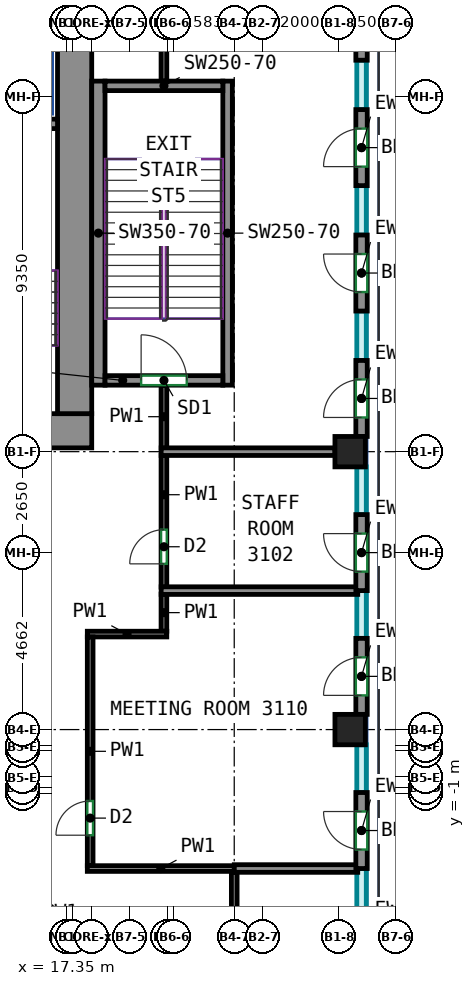
"""IFC4 building model, lengths in metres.
Left out: names, types, materials, properties, quantities, classifications, styles, units other than length and angle.
Written with IfcOpenShell. Run it as: python <this file> out.ifc"""

import sys

from ifc_helpers import new_model, si_unit, direction, frame, frame_2d, origin, origin_2d, place, context, subcontext, project, spatial, rectangle, extrude, source, transform, mapped, element, fill, save


model = new_model("IFC4")
c1 = context("Model", 3, precision=1e-05, world=origin(), true_north=direction((0.0, 1.0)))
c2 = subcontext(c1, "Body", "Model", "MODEL_VIEW")
j1 = project(units=[si_unit("LENGTHUNIT", "METRE"), si_unit("PLANEANGLEUNIT", "RADIAN")], contexts=[c1])
p1 = place(None, origin())
s1 = spatial("IfcSite", under=j1, at=p1, CompositionType="ELEMENT")
p2 = place(p1, origin())
s2 = spatial("IfcBuilding", under=s1, at=p2, CompositionType="ELEMENT")
p3 = place(p2, frame((0.0, 0.0, 138.5)))
s3 = spatial("IfcBuildingStorey", under=s2, at=p3, CompositionType="ELEMENT", Elevation=138.5)
m1 = source(origin(), c2, "Body", "SweptSolid", [
    extrude(rectangle(XDim=0.8, YDim=0.8, at=origin_2d()), origin(), (0.0, 0.0, 1.0), 5.12),
])
for number, where, z_axis, x_axis in (
    (1, (24.8, 0.688, 0.0), (0.0, 0.0, 1.0), (1.0, 0.0, 0.0)),
    (2, (24.8, 8.0, 0.0), (0.0, 0.0, 1.0), (1.0, 0.0, 0.0)),
):
    element("IfcColumn", number, at=place(p3, frame(where, z_axis=z_axis, x_axis=x_axis)), inside=s3, PredefinedType="COLUMN", context=c2, shape_type="MappedRepresentation", body=[
        mapped(m1, transform((0.0, 0.0, 0.0))),
    ])
m2 = source(origin(), c2, "Body", "SweptSolid", [
    extrude(rectangle(XDim=5.53, YDim=0.9, at=frame_2d((2.765, 0.0))), origin(), (0.0, 0.0, 1.0), 5.12),
])
p4 = place(p3, frame((12.47, 8.55, 0.0), z_axis=(0.0, 0.0, 1.0), x_axis=(1.0, 0.0, 0.0)))
e3 = element("IfcWall", 3, at=p4, inside=s3, PredefinedType="SHEAR", context=c2, shape_type="MappedRepresentation", body=[
    mapped(m2, transform((0.0, 0.0, 0.0))),
])
p5 = place(p4, frame((2.18, 0.0, 0.0)))
e4 = element("IfcOpeningElement", 4, at=p5, cuts=e3, PredefinedType="OPENING", context=c2, shape_type="SweptSolid", body=[
    extrude(rectangle(XDim=1.2, YDim=2.1, at=frame_2d((0.6, 1.05))), frame((0.0, 0.46, 0.0), z_axis=(0.0, -1.0, 0.0), x_axis=(1.0, 0.0, 0.0)), (0.0, 0.0, 1.0), 0.92),
])
m3 = source(origin(), c2, "Body", "SweptSolid", [
    extrude(rectangle(XDim=12.0, YDim=0.9, at=frame_2d((6.0, 0.0))), origin(), (0.0, 0.0, 1.0), 5.12),
])
p6 = place(p3, frame((17.55, 9.0, 0.0), z_axis=(0.0, 0.0, 1.0), x_axis=(0.0, 1.0, 0.0)))
e5 = element("IfcWall", 5, at=p6, inside=s3, PredefinedType="SHEAR", context=c2, shape_type="MappedRepresentation", body=[
    mapped(m3, transform((0.0, 0.0, 0.0))),
])
m4 = source(origin(), c2, "Body", "SweptSolid", [
    extrude(rectangle(XDim=3.7, YDim=0.25, at=frame_2d((1.85, 0.0))), origin(), (0.0, 0.0, 1.0), 5.12),
])
p7 = place(p3, frame((13.4, 16.625, 0.0), z_axis=(0.0, 0.0, 1.0), x_axis=(1.0, 0.0, 0.0)))
e6 = element("IfcWall", 6, at=p7, inside=s3, PredefinedType="SHEAR", context=c2, shape_type="MappedRepresentation", body=[
    mapped(m4, transform((0.0, 0.0, 0.0))),
])
m5 = source(origin(), c2, "Body", "SweptSolid", [
    extrude(rectangle(XDim=8.0, YDim=0.35, at=frame_2d((4.0, 0.0))), origin(), (0.0, 0.0, 1.0), 5.12),
])
p8 = place(p3, frame((18.175, 9.75, 0.0), z_axis=(0.0, 0.0, 1.0), x_axis=(0.0, 1.0, 0.0)))
e7 = element("IfcWall", 7, at=p8, inside=s3, PredefinedType="SHEAR", context=c2, shape_type="MappedRepresentation", body=[
    mapped(m5, transform((0.0, 0.0, 0.0))),
])
m6 = source(origin(), c2, "Body", "SweptSolid", [
    extrude(rectangle(XDim=8.0, YDim=0.25, at=frame_2d((4.0, 0.0))), origin(), (0.0, 0.0, 1.0), 5.12),
])
p9 = place(p3, frame((21.575, 9.75, 0.0), z_axis=(0.0, 0.0, 1.0), x_axis=(0.0, 1.0, 0.0)))
e8 = element("IfcWall", 8, at=p9, inside=s3, PredefinedType="SHEAR", context=c2, shape_type="MappedRepresentation", body=[
    mapped(m6, transform((0.0, 0.0, 0.0))),
])
m7 = source(origin(), c2, "Body", "SweptSolid", [
    extrude(rectangle(XDim=3.1, YDim=0.25, at=frame_2d((1.55, 0.0))), origin(), (0.0, 0.0, 1.0), 5.12),
])
p10 = place(p3, frame((18.35, 9.875, 0.0), z_axis=(0.0, 0.0, 1.0), x_axis=(1.0, 0.0, 0.0)))
e9 = element("IfcWall", 9, at=p10, inside=s3, PredefinedType="SHEAR", context=c2, shape_type="MappedRepresentation", body=[
    mapped(m7, transform((0.0, 0.0, 0.0))),
])
p11 = place(p10, frame((0.95, 0.0, 0.0)))
e10 = element("IfcOpeningElement", 10, at=p11, cuts=e9, PredefinedType="OPENING", context=c2, shape_type="SweptSolid", body=[
    extrude(rectangle(XDim=1.2, YDim=2.1, at=frame_2d((0.6, 1.05))), frame((0.0, 0.135, 0.0), z_axis=(0.0, -1.0, 0.0), x_axis=(1.0, 0.0, 0.0)), (0.0, 0.0, 1.0), 0.27),
])
p12 = place(p3, frame((18.35, 17.625, 0.0), z_axis=(0.0, 0.0, 1.0), x_axis=(1.0, 0.0, 0.0)))
e11 = element("IfcWall", 11, at=p12, inside=s3, PredefinedType="SHEAR", context=c2, shape_type="MappedRepresentation", body=[
    mapped(m7, transform((0.0, 0.0, 0.0))),
])
m8 = source(origin(), c2, "Body", "SweptSolid", [
    extrude(rectangle(XDim=2.0, YDim=0.3, at=frame_2d((1.0, 0.0))), origin(), (0.0, 0.0, 1.0), 5.12),
])
p13 = place(p3, frame((25.1, -2.969, 0.0), z_axis=(0.0, 0.0, 1.0), x_axis=(0.0, 1.0, 0.0)))
e12 = element("IfcWall", 12, at=p13, inside=s3, PredefinedType="SOLIDWALL", context=c2, shape_type="MappedRepresentation", body=[
    mapped(m8, transform((0.0, 0.0, 0.0))),
])
p14 = place(p13, frame((0.5, 0.0, 0.0)))
e13 = element("IfcOpeningElement", 13, at=p14, cuts=e12, PredefinedType="OPENING", context=c2, shape_type="SweptSolid", body=[
    extrude(rectangle(XDim=1.0, YDim=2.1, at=frame_2d((0.5, 1.05))), frame((0.0, 0.16, 0.0), z_axis=(0.0, -1.0, 0.0), x_axis=(1.0, 0.0, 0.0)), (0.0, 0.0, 1.0), 0.32),
])
p15 = place(p3, frame((25.1, 1.087, 0.0), z_axis=(0.0, 0.0, 1.0), x_axis=(0.0, 1.0, 0.0)))
e14 = element("IfcWall", 14, at=p15, inside=s3, PredefinedType="SOLIDWALL", context=c2, shape_type="MappedRepresentation", body=[
    mapped(m8, transform((0.0, 0.0, 0.0))),
])
p16 = place(p15, frame((0.5, 0.0, 0.0)))
e15 = element("IfcOpeningElement", 15, at=p16, cuts=e14, PredefinedType="OPENING", context=c2, shape_type="SweptSolid", body=[
    extrude(rectangle(XDim=1.0, YDim=2.1, at=frame_2d((0.5, 1.05))), frame((0.0, 0.16, 0.0), z_axis=(0.0, -1.0, 0.0), x_axis=(1.0, 0.0, 0.0)), (0.0, 0.0, 1.0), 0.32),
])
p17 = place(p3, frame((25.1, 4.344, 0.0), z_axis=(0.0, 0.0, 1.0), x_axis=(0.0, 1.0, 0.0)))
e16 = element("IfcWall", 16, at=p17, inside=s3, PredefinedType="SOLIDWALL", context=c2, shape_type="MappedRepresentation", body=[
    mapped(m8, transform((0.0, 0.0, 0.0))),
])
p18 = place(p17, frame((0.5, 0.0, 0.0)))
e17 = element("IfcOpeningElement", 17, at=p18, cuts=e16, PredefinedType="OPENING", context=c2, shape_type="SweptSolid", body=[
    extrude(rectangle(XDim=1.0, YDim=2.1, at=frame_2d((0.5, 1.05))), frame((0.0, 0.16, 0.0), z_axis=(0.0, -1.0, 0.0), x_axis=(1.0, 0.0, 0.0)), (0.0, 0.0, 1.0), 0.32),
])
p19 = place(p3, frame((25.1, 8.4, 0.0), z_axis=(0.0, 0.0, 1.0), x_axis=(0.0, 1.0, 0.0)))
e18 = element("IfcWall", 18, at=p19, inside=s3, PredefinedType="SOLIDWALL", context=c2, shape_type="MappedRepresentation", body=[
    mapped(m8, transform((0.0, 0.0, 0.0))),
])
p20 = place(p19, frame((0.5, 0.0, 0.0)))
e19 = element("IfcOpeningElement", 19, at=p20, cuts=e18, PredefinedType="OPENING", context=c2, shape_type="SweptSolid", body=[
    extrude(rectangle(XDim=1.0, YDim=2.1, at=frame_2d((0.5, 1.05))), frame((0.0, 0.16, 0.0), z_axis=(0.0, -1.0, 0.0), x_axis=(1.0, 0.0, 0.0)), (0.0, 0.0, 1.0), 0.32),
])
p21 = place(p3, frame((25.1, 11.7, 0.0), z_axis=(0.0, 0.0, 1.0), x_axis=(0.0, 1.0, 0.0)))
e20 = element("IfcWall", 20, at=p21, inside=s3, PredefinedType="SOLIDWALL", context=c2, shape_type="MappedRepresentation", body=[
    mapped(m8, transform((0.0, 0.0, 0.0))),
])
p22 = place(p21, frame((0.5, 0.0, 0.0)))
e21 = element("IfcOpeningElement", 21, at=p22, cuts=e20, PredefinedType="OPENING", context=c2, shape_type="SweptSolid", body=[
    extrude(rectangle(XDim=1.0, YDim=2.1, at=frame_2d((0.5, 1.05))), frame((0.0, 0.16, 0.0), z_axis=(0.0, -1.0, 0.0), x_axis=(1.0, 0.0, 0.0)), (0.0, 0.0, 1.0), 0.32),
])
p23 = place(p3, frame((25.1, 15.0, 0.0), z_axis=(0.0, 0.0, 1.0), x_axis=(0.0, 1.0, 0.0)))
e22 = element("IfcWall", 22, at=p23, inside=s3, PredefinedType="SOLIDWALL", context=c2, shape_type="MappedRepresentation", body=[
    mapped(m8, transform((0.0, 0.0, 0.0))),
])
p24 = place(p23, frame((0.5, 0.0, 0.0)))
e23 = element("IfcOpeningElement", 23, at=p24, cuts=e22, PredefinedType="OPENING", context=c2, shape_type="SweptSolid", body=[
    extrude(rectangle(XDim=1.0, YDim=2.1, at=frame_2d((0.5, 1.05))), frame((0.0, 0.16, 0.0), z_axis=(0.0, -1.0, 0.0), x_axis=(1.0, 0.0, 0.0)), (0.0, 0.0, 1.0), 0.32),
])
p25 = place(p3, frame((25.1, 18.3, 0.0), z_axis=(0.0, 0.0, 1.0), x_axis=(0.0, 1.0, 0.0)))
e24 = element("IfcWall", 24, at=p25, inside=s3, PredefinedType="SOLIDWALL", context=c2, shape_type="MappedRepresentation", body=[
    mapped(m8, transform((0.0, 0.0, 0.0))),
])
p26 = place(p25, frame((0.5, 0.0, 0.0)))
e25 = element("IfcOpeningElement", 25, at=p26, cuts=e24, PredefinedType="OPENING", context=c2, shape_type="SweptSolid", body=[
    extrude(rectangle(XDim=1.0, YDim=2.1, at=frame_2d((0.5, 1.05))), frame((0.0, 0.16, 0.0), z_axis=(0.0, -1.0, 0.0), x_axis=(1.0, 0.0, 0.0)), (0.0, 0.0, 1.0), 0.32),
])
p27 = place(p3, frame((19.9, 4.434, 0.0), z_axis=(0.0, 0.0, 1.0), x_axis=(0.0, 1.0, 0.0)))
e26 = element("IfcWall", 26, at=p27, inside=s3, PredefinedType="PARTITIONING", context=c2, shape_type="SweptSolid", body=[
    extrude(rectangle(XDim=3.476, YDim=0.15, at=frame_2d((1.738, 0.0))), origin(), (0.0, 0.0, 1.0), 5.12),
])
p28 = place(p27, frame((0.614, 0.0, 0.0)))
e27 = element("IfcOpeningElement", 27, at=p28, cuts=e26, PredefinedType="OPENING", context=c2, shape_type="SweptSolid", body=[
    extrude(rectangle(XDim=0.9, YDim=2.1, at=frame_2d((0.45, 1.05))), frame((0.0, 0.085, 0.0), z_axis=(0.0, -1.0, 0.0), x_axis=(1.0, 0.0, 0.0)), (0.0, 0.0, 1.0), 0.17),
])
p29 = place(p3, frame((19.9, 17.75, 0.0), z_axis=(0.0, 0.0, 1.0), x_axis=(0.0, 1.0, 0.0)))
e28 = element("IfcWall", 28, at=p29, inside=s3, PredefinedType="PARTITIONING", context=c2, shape_type="SweptSolid", body=[
    extrude(rectangle(XDim=4.175, YDim=0.15, at=frame_2d((2.087, 0.0))), origin(), (0.0, 0.0, 1.0), 5.12),
])
p30 = place(p29, frame((2.87, 0.0, 0.0)))
e29 = element("IfcOpeningElement", 29, at=p30, cuts=e28, PredefinedType="OPENING", context=c2, shape_type="SweptSolid", body=[
    extrude(rectangle(XDim=0.9, YDim=2.1, at=frame_2d((0.45, 1.05))), frame((0.0, 0.085, 0.0), z_axis=(0.0, -1.0, 0.0), x_axis=(1.0, 0.0, 0.0)), (0.0, 0.0, 1.0), 0.17),
])
p31 = place(p3, frame((19.9, 8.09, 0.0), z_axis=(0.0, 0.0, 1.0), x_axis=(0.0, 1.0, 0.0)))
e30 = element("IfcWall", 30, at=p31, inside=s3, PredefinedType="PARTITIONING", context=c2, shape_type="SweptSolid", body=[
    extrude(rectangle(XDim=1.66, YDim=0.15, at=frame_2d((0.83, 0.0))), origin(), (0.0, 0.0, 1.0), 5.12),
])
p32 = place(p3, frame((19.9, 3.275, 0.0), z_axis=(0.0, 0.0, 1.0), x_axis=(0.0, 1.0, 0.0)))
e31 = element("IfcWall", 31, at=p32, inside=s3, PredefinedType="PARTITIONING", context=c2, shape_type="SweptSolid", body=[
    extrude(rectangle(XDim=0.979, YDim=0.15, at=frame_2d((0.49, 0.0))), origin(), (0.0, 0.0, 1.0), 5.12),
])
p33 = place(p3, frame((17.884, 3.2, 0.0), z_axis=(0.0, 0.0, 1.0), x_axis=(1.0, 0.0, 0.0)))
e32 = element("IfcWall", 32, at=p33, inside=s3, PredefinedType="PARTITIONING", context=c2, shape_type="SweptSolid", body=[
    extrude(rectangle(XDim=2.091, YDim=0.15, at=frame_2d((1.045, 0.0))), origin(), (0.0, 0.0, 1.0), 5.12),
])
p34 = place(p3, frame((17.959, -2.894, 0.0), z_axis=(0.0, 0.0, 1.0), x_axis=(0.0, 1.0, 0.0)))
e33 = element("IfcWall", 33, at=p34, inside=s3, PredefinedType="PARTITIONING", context=c2, shape_type="SweptSolid", body=[
    extrude(rectangle(XDim=6.019, YDim=0.15, at=frame_2d((3.01, 0.0))), origin(), (0.0, 0.0, 1.0), 5.12),
])
p35 = place(p34, frame((0.802, 0.0, 0.0)))
e34 = element("IfcOpeningElement", 34, at=p35, cuts=e33, PredefinedType="OPENING", context=c2, shape_type="SweptSolid", body=[
    extrude(rectangle(XDim=0.9, YDim=2.1, at=frame_2d((0.45, 1.05))), frame((0.0, 0.085, 0.0), z_axis=(0.0, -1.0, 0.0), x_axis=(1.0, 0.0, 0.0)), (0.0, 0.0, 1.0), 0.17),
])
p36 = place(p3, frame((21.751, -2.969, 0.0), z_axis=(0.0, 0.0, 1.0), x_axis=(-1.0, 0.0, 0.0)))
e35 = element("IfcWall", 35, at=p36, inside=s3, PredefinedType="PARTITIONING", context=c2, shape_type="SweptSolid", body=[
    extrude(rectangle(XDim=3.867, YDim=0.15, at=frame_2d((1.934, 0.0))), origin(), (0.0, 0.0, 1.0), 5.12),
])
p37 = place(p3, frame((21.75, -7.75, 0.0), z_axis=(0.0, 0.0, 1.0), x_axis=(0.0, 1.0, 0.0)))
e36 = element("IfcWall", 36, at=p37, inside=s3, PredefinedType="PARTITIONING", context=c2, shape_type="SweptSolid", body=[
    extrude(rectangle(XDim=4.682, YDim=0.15, at=frame_2d((2.341, 0.0))), origin(), (0.0, 0.0, 1.0), 5.12),
])
p38 = place(p37, frame((0.801, 0.0, 0.0)))
e37 = element("IfcOpeningElement", 37, at=p38, cuts=e36, PredefinedType="OPENING", context=c2, shape_type="SweptSolid", body=[
    extrude(rectangle(XDim=0.9, YDim=2.1, at=frame_2d((0.45, 1.05))), frame((0.0, 0.085, 0.0), z_axis=(0.0, -1.0, 0.0), x_axis=(1.0, 0.0, 0.0)), (0.0, 0.0, 1.0), 0.17),
])
p39 = place(p3, frame((19.827, 8.0, 0.0), z_axis=(0.0, 0.0, 1.0), x_axis=(1.0, 0.0, 0.0)))
e38 = element("IfcWall", 38, at=p39, inside=s3, PredefinedType="PARTITIONING", context=c2, shape_type="SweptSolid", body=[
    extrude(rectangle(XDim=4.573, YDim=0.2, at=frame_2d((2.287, 0.0))), origin(), (0.0, 0.0, 1.0), 5.12),
])
p40 = place(p3, frame((19.827, 4.344, 0.0), z_axis=(0.0, 0.0, 1.0), x_axis=(1.0, 0.0, 0.0)))
e39 = element("IfcWall", 39, at=p40, inside=s3, PredefinedType="PARTITIONING", context=c2, shape_type="SweptSolid", body=[
    extrude(rectangle(XDim=5.173, YDim=0.2, at=frame_2d((2.586, 0.0))), origin(), (0.0, 0.0, 1.0), 5.12),
])
p41 = place(p3, frame((21.751, -2.968, 0.0), z_axis=(0.0, 0.0, 1.0), x_axis=(0.999999954829, -0.000300571071, 0.0)))
e40 = element("IfcWall", 40, at=p41, inside=s3, PredefinedType="PARTITIONING", context=c2, shape_type="SweptSolid", body=[
    extrude(rectangle(XDim=3.249, YDim=0.2, at=frame_2d((1.625, 0.0))), origin(), (0.0, 0.0, 1.0), 5.12),
])
p42 = place(p14, origin())
e41 = element("IfcDoor", 41, at=p42, inside=s3, OperationType="SINGLE_SWING_RIGHT", PredefinedType="DOOR", context=c2, shape_type="SweptSolid", body=[
    extrude(rectangle(XDim=1.0, YDim=2.1, at=frame_2d((0.5, 1.05))), frame((0.0, 0.025, 0.0), z_axis=(0.0, -1.0, 0.0), x_axis=(1.0, 0.0, 0.0)), (0.0, 0.0, 1.0), 0.05),
])
fill(e13, e41)
p43 = place(p16, origin())
e42 = element("IfcDoor", 42, at=p43, inside=s3, OperationType="SINGLE_SWING_LEFT", PredefinedType="DOOR", context=c2, shape_type="SweptSolid", body=[
    extrude(rectangle(XDim=1.0, YDim=2.1, at=frame_2d((0.5, 1.05))), frame((0.0, 0.025, 0.0), z_axis=(0.0, -1.0, 0.0), x_axis=(1.0, 0.0, 0.0)), (0.0, 0.0, 1.0), 0.05),
])
fill(e15, e42)
p44 = place(p18, origin())
e43 = element("IfcDoor", 43, at=p44, inside=s3, OperationType="SINGLE_SWING_RIGHT", PredefinedType="DOOR", context=c2, shape_type="SweptSolid", body=[
    extrude(rectangle(XDim=1.0, YDim=2.1, at=frame_2d((0.5, 1.05))), frame((0.0, 0.025, 0.0), z_axis=(0.0, -1.0, 0.0), x_axis=(1.0, 0.0, 0.0)), (0.0, 0.0, 1.0), 0.05),
])
fill(e17, e43)
p45 = place(p20, origin())
e44 = element("IfcDoor", 44, at=p45, inside=s3, OperationType="SINGLE_SWING_LEFT", PredefinedType="DOOR", context=c2, shape_type="SweptSolid", body=[
    extrude(rectangle(XDim=1.0, YDim=2.1, at=frame_2d((0.5, 1.05))), frame((0.0, 0.025, 0.0), z_axis=(0.0, -1.0, 0.0), x_axis=(1.0, 0.0, 0.0)), (0.0, 0.0, 1.0), 0.05),
])
fill(e19, e44)
p46 = place(p22, origin())
e45 = element("IfcDoor", 45, at=p46, inside=s3, OperationType="SINGLE_SWING_RIGHT", PredefinedType="DOOR", context=c2, shape_type="SweptSolid", body=[
    extrude(rectangle(XDim=1.0, YDim=2.1, at=frame_2d((0.5, 1.05))), frame((0.0, 0.025, 0.0), z_axis=(0.0, -1.0, 0.0), x_axis=(1.0, 0.0, 0.0)), (0.0, 0.0, 1.0), 0.05),
])
fill(e21, e45)
p47 = place(p24, origin())
e46 = element("IfcDoor", 46, at=p47, inside=s3, OperationType="SINGLE_SWING_LEFT", PredefinedType="DOOR", context=c2, shape_type="SweptSolid", body=[
    extrude(rectangle(XDim=1.0, YDim=2.1, at=frame_2d((0.5, 1.05))), frame((0.0, 0.025, 0.0), z_axis=(0.0, -1.0, 0.0), x_axis=(1.0, 0.0, 0.0)), (0.0, 0.0, 1.0), 0.05),
])
fill(e23, e46)
p48 = place(p11, origin())
e47 = element("IfcDoor", 47, at=p48, inside=s3, OperationType="DOUBLE_DOOR_SINGLE_SWING", PredefinedType="DOOR", context=c2, shape_type="SweptSolid", body=[
    extrude(rectangle(XDim=1.2, YDim=2.1, at=frame_2d((0.6, 1.05))), frame((0.0, 0.025, 0.0), z_axis=(0.0, -1.0, 0.0), x_axis=(1.0, 0.0, 0.0)), (0.0, 0.0, 1.0), 0.05),
])
fill(e10, e47)
p49 = place(p35, origin())
e48 = element("IfcDoor", 48, at=p49, inside=s3, OperationType="SINGLE_SWING_LEFT", PredefinedType="DOOR", context=c2, shape_type="SweptSolid", body=[
    extrude(rectangle(XDim=0.9, YDim=2.1, at=frame_2d((0.45, 1.05))), frame((0.0, 0.025, 0.0), z_axis=(0.0, -1.0, 0.0), x_axis=(1.0, 0.0, 0.0)), (0.0, 0.0, 1.0), 0.05),
])
fill(e34, e48)
p50 = place(p28, origin())
e49 = element("IfcDoor", 49, at=p50, inside=s3, OperationType="SINGLE_SWING_LEFT", PredefinedType="DOOR", context=c2, shape_type="SweptSolid", body=[
    extrude(rectangle(XDim=0.9, YDim=2.1, at=frame_2d((0.45, 1.05))), frame((0.0, 0.025, 0.0), z_axis=(0.0, -1.0, 0.0), x_axis=(1.0, 0.0, 0.0)), (0.0, 0.0, 1.0), 0.05),
])
fill(e27, e49)
save(model, sys.argv[1])
